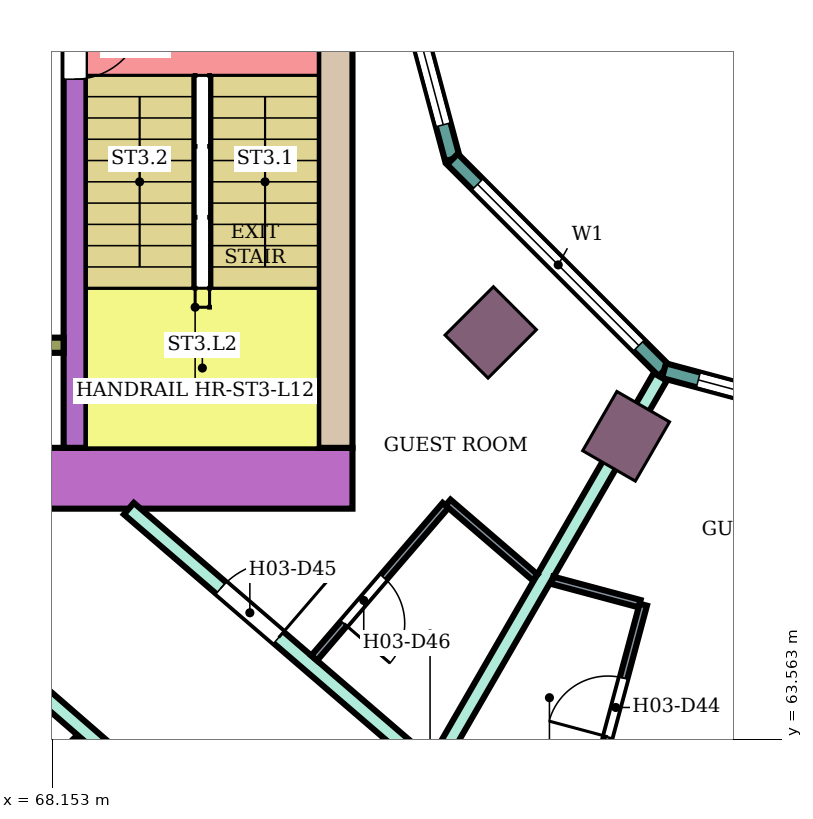
"""IFC4 building model, lengths in metres.
Left out: names, types, materials, properties, quantities, classifications, styles, units other than length and angle.
Written with IfcOpenShell. Run it as: python <this file> out.ifc"""

import sys

from ifc_helpers import new_model, si_unit, direction, frame, frame_2d, origin, origin_2d, place, context, subcontext, project, spatial, rectangle, extrude, element, fill, save


model = new_model("IFC4")
c1 = context("Model", 3, precision=1e-05, world=origin(), true_north=direction((0.0, 1.0)))
c2 = subcontext(c1, "Body", "Model", "MODEL_VIEW")
j1 = project(units=[si_unit("LENGTHUNIT", "METRE"), si_unit("PLANEANGLEUNIT", "RADIAN")], contexts=[c1])
p1 = place(None, origin())
s1 = spatial("IfcSite", under=j1, at=p1, CompositionType="ELEMENT")
p2 = place(p1, origin())
s2 = spatial("IfcBuilding", under=s1, at=p2, CompositionType="ELEMENT")
p3 = place(p2, frame((0.0, 0.0, 55.4)))
s3 = spatial("IfcBuildingStorey", under=s2, at=p3, CompositionType="ELEMENT", Elevation=55.4)
for number, where, z_axis, x_axis in (
    (1, (73.919, 68.919, 0.0), (0.0, 0.0, 1.0), (-0.707, -0.707, 0.0)),
    (2, (75.7, 67.552, 0.0), (0.0, 0.0, 1.0), (-0.5, -0.866, 0.0)),
):
    element("IfcColumn", number, at=place(p3, frame(where, z_axis=z_axis, x_axis=x_axis)), inside=s3, PredefinedType="COLUMN", context=c2, shape_type="SweptSolid", body=[
        extrude(rectangle(XDim=0.9, YDim=0.8, at=origin_2d()), origin(), (0.0, 0.0, 1.0), 3.8),
    ])
p4 = place(p3, frame((72.1, 67.0, 0.0), z_axis=(0.0, 0.0, 1.0), x_axis=(-1.0, 0.0, 0.0)))
e3 = element("IfcWall", 3, at=p4, inside=s3, PredefinedType="SHEAR", context=c2, shape_type="SweptSolid", body=[
    extrude(rectangle(XDim=14.7, YDim=0.8, at=frame_2d((7.35, 0.0))), origin(), (0.0, 0.0, 1.0), 3.48),
])
p5 = place(p4, frame((4.2, 0.0, 0.0)))
e4 = element("IfcOpeningElement", 4, at=p5, cuts=e3, PredefinedType="OPENING", context=c2, shape_type="SweptSolid", body=[
    extrude(rectangle(XDim=2.4, YDim=2.4, at=frame_2d((1.2, 1.2))), frame((0.0, 0.41, 0.0), z_axis=(0.0, -1.0, 0.0), x_axis=(1.0, 0.0, 0.0)), (0.0, 0.0, 1.0), 0.82),
])
p6 = place(p3, frame((71.875, 75.0, 0.0), z_axis=(0.0, 0.0, 1.0), x_axis=(0.0, -1.0, 0.0)))
e5 = element("IfcWall", 5, at=p6, inside=s3, PredefinedType="SHEAR", context=c2, shape_type="SweptSolid", body=[
    extrude(rectangle(XDim=7.6, YDim=0.45, at=frame_2d((3.8, 0.0))), origin(), (0.0, 0.0, 1.0), 3.48),
])
p7 = place(p3, frame((68.45, 75.0, 0.0), z_axis=(0.0, 0.0, 1.0), x_axis=(0.0, -1.0, 0.0)))
e6 = element("IfcWall", 6, at=p7, inside=s3, PredefinedType="SHEAR", context=c2, shape_type="SweptSolid", body=[
    extrude(rectangle(XDim=7.6, YDim=0.3, at=frame_2d((3.8, 0.0))), origin(), (0.0, 0.0, 1.0), 3.48),
])
p8 = place(p7, frame((1.85, 0.0, 0.0)))
e7 = element("IfcOpeningElement", 7, at=p8, cuts=e6, PredefinedType="OPENING", context=c2, shape_type="SweptSolid", body=[
    extrude(rectangle(XDim=0.9, YDim=2.1, at=frame_2d((0.45, 1.05))), frame((0.0, 0.16, 0.0), z_axis=(0.0, -1.0, 0.0), x_axis=(1.0, 0.0, 0.0)), (0.0, 0.0, 1.0), 0.32),
])
p9 = place(p3, frame((68.3, 68.75, 0.0), z_axis=(0.0, 0.0, 1.0), x_axis=(-1.0, 0.0, 0.0)))
e8 = element("IfcWall", 8, at=p9, inside=s3, PredefinedType="SHEAR", context=c2, shape_type="SweptSolid", body=[
    extrude(rectangle(XDim=4.65, YDim=0.2, at=frame_2d((2.325, 0.0))), origin(), (0.0, 0.0, 1.0), 3.48),
])
p10 = place(p3, frame((72.396, 75.0, 0.0), z_axis=(0.0, 0.0, 1.0), x_axis=(0.258789828301, -0.965933654434, 0.0)))
e9 = element("IfcWall", 9, at=p10, inside=s3, PredefinedType="NOTDEFINED", context=c2, shape_type="SweptSolid", body=[
    extrude(rectangle(XDim=3.936, YDim=0.2, at=frame_2d((1.968, 0.0))), origin(), (0.0, 0.0, 1.0), 3.8),
])
p11 = place(p10, frame((0.468, 0.0, 0.9)))
e10 = element("IfcOpeningElement", 10, at=p11, cuts=e9, PredefinedType="OPENING", context=c2, shape_type="SweptSolid", body=[
    extrude(rectangle(XDim=3.0, YDim=2.3, at=frame_2d((1.5, 1.15))), frame((0.0, 0.11, 0.0), z_axis=(0.0, -1.0, 0.0), x_axis=(1.0, 0.0, 0.0)), (0.0, 0.0, 1.0), 0.22),
])
p12 = place(p3, frame((73.415, 71.198, 0.0), z_axis=(0.0, 0.0, 1.0), x_axis=(0.707106781187, -0.707106781187, 0.0)))
e11 = element("IfcWall", 11, at=p12, inside=s3, PredefinedType="NOTDEFINED", context=c2, shape_type="SweptSolid", body=[
    extrude(rectangle(XDim=3.936, YDim=0.2, at=frame_2d((1.968, 0.0))), origin(), (0.0, 0.0, 1.0), 3.8),
])
p13 = place(p12, frame((0.468, 0.0, 0.9)))
e12 = element("IfcOpeningElement", 12, at=p13, cuts=e11, PredefinedType="OPENING", context=c2, shape_type="SweptSolid", body=[
    extrude(rectangle(XDim=3.0, YDim=2.3, at=frame_2d((1.5, 1.15))), frame((0.0, 0.11, 0.0), z_axis=(0.0, -1.0, 0.0), x_axis=(1.0, 0.0, 0.0)), (0.0, 0.0, 1.0), 0.22),
])
p14 = place(p3, frame((76.198, 68.415, 0.0), z_axis=(0.0, 0.0, 1.0), x_axis=(0.965933654434, -0.258789828301, 0.0)))
e13 = element("IfcWall", 13, at=p14, inside=s3, PredefinedType="NOTDEFINED", context=c2, shape_type="SweptSolid", body=[
    extrude(rectangle(XDim=3.936, YDim=0.2, at=frame_2d((1.968, 0.0))), origin(), (0.0, 0.0, 1.0), 3.8),
])
p15 = place(p14, frame((0.468, 0.0, 0.9)))
e14 = element("IfcOpeningElement", 14, at=p15, cuts=e13, PredefinedType="OPENING", context=c2, shape_type="SweptSolid", body=[
    extrude(rectangle(XDim=3.0, YDim=2.3, at=frame_2d((1.5, 1.15))), frame((0.0, 0.11, 0.0), z_axis=(0.0, -1.0, 0.0), x_axis=(1.0, 0.0, 0.0)), (0.0, 0.0, 1.0), 0.22),
])
p16 = place(p3, frame((63.596, 58.596, 0.0), z_axis=(0.0, 0.0, 1.0), x_axis=(0.707106781187, 0.707106781187, 0.0)))
e15 = element("IfcWall", 15, at=p16, inside=s3, PredefinedType="PARTITIONING", context=c2, shape_type="SweptSolid", body=[
    extrude(rectangle(XDim=7.005, YDim=0.2, at=frame_2d((3.503, 0.0))), origin(), (0.0, 0.0, 1.0), 3.35),
])
p17 = place(p3, frame((67.081, 64.971, 0.0), z_axis=(0.0, 0.0, 1.0), x_axis=(0.755031061605, -0.65568902386, 0.0)))
e16 = element("IfcWall", 16, at=p17, inside=s3, PredefinedType="PARTITIONING", context=c2, shape_type="SweptSolid", body=[
    extrude(rectangle(XDim=6.186, YDim=0.2, at=frame_2d((3.093, 0.0))), origin(), (0.0, 0.0, 1.0), 3.35),
])
p18 = place(p17, frame((4.755, 0.0, 0.0)))
e17 = element("IfcOpeningElement", 17, at=p18, cuts=e16, PredefinedType="OPENING", context=c2, shape_type="SweptSolid", body=[
    extrude(rectangle(XDim=1.0, YDim=2.1, at=frame_2d((0.5, 1.05))), frame((0.0, 0.11, 0.0), z_axis=(0.0, -1.0, 0.0), x_axis=(1.0, 0.0, 0.0)), (0.0, 0.0, 1.0), 0.22),
])
p19 = place(p3, frame((69.158, 66.6, 0.0), z_axis=(0.0, 0.0, 1.0), x_axis=(0.757976058094, -0.652282373943, 0.0)))
e18 = element("IfcWall", 18, at=p19, inside=s3, PredefinedType="PARTITIONING", context=c2, shape_type="SweptSolid", body=[
    extrude(rectangle(XDim=5.16, YDim=0.2, at=frame_2d((2.58, 0.0))), origin(), (0.0, 0.0, 1.0), 3.35),
])
p20 = place(p19, frame((1.6, 0.0, 0.0)))
e19 = element("IfcOpeningElement", 19, at=p20, cuts=e18, PredefinedType="OPENING", context=c2, shape_type="SweptSolid", body=[
    extrude(rectangle(XDim=1.0, YDim=2.1, at=frame_2d((0.5, 1.05))), frame((0.0, 0.11, 0.0), z_axis=(0.0, -1.0, 0.0), x_axis=(1.0, 0.0, 0.0)), (0.0, 0.0, 1.0), 0.22),
])
p21 = place(p3, frame((73.17, 63.177, 0.0), z_axis=(0.0, 0.0, 1.0), x_axis=(0.500239348149, 0.865887171959, 0.0)))
e20 = element("IfcWall", 20, at=p21, inside=s3, PredefinedType="PARTITIONING", context=c2, shape_type="SweptSolid", body=[
    extrude(rectangle(XDim=5.955, YDim=0.2, at=frame_2d((2.978, 0.0))), origin(), (0.0, 0.0, 1.0), 3.35),
])
p22 = place(p3, frame((71.596, 64.635, 0.0), z_axis=(0.0, 0.0, 1.0), x_axis=(0.652285007511, 0.757973791748, 0.0)))
e21 = element("IfcWall", 21, at=p22, inside=s3, PredefinedType="PARTITIONING", context=c2, shape_type="SweptSolid", body=[
    extrude(rectangle(XDim=2.65, YDim=0.1, at=frame_2d((1.325, 0.0))), origin(), (0.0, 0.0, 1.0), 3.35),
])
p23 = place(p22, frame((0.6, 0.0, 0.0)))
e22 = element("IfcOpeningElement", 22, at=p23, cuts=e21, PredefinedType="OPENING", context=c2, shape_type="SweptSolid", body=[
    extrude(rectangle(XDim=0.8, YDim=2.1, at=frame_2d((0.4, 1.05))), frame((0.0, 0.06, 0.0), z_axis=(0.0, -1.0, 0.0), x_axis=(1.0, 0.0, 0.0)), (0.0, 0.0, 1.0), 0.12),
])
p24 = place(p3, frame((73.357, 66.681, 0.0), z_axis=(0.0, 0.0, 1.0), x_axis=(0.758263469747, -0.651948242154, 0.0)))
e23 = element("IfcWall", 23, at=p24, inside=s3, PredefinedType="PARTITIONING", context=c2, shape_type="SweptSolid", body=[
    extrude(rectangle(XDim=1.511, YDim=0.1, at=frame_2d((0.755, 0.0))), origin(), (0.0, 0.0, 1.0), 3.35),
])
p25 = place(p3, frame((74.729, 65.657, 0.0), z_axis=(0.0, 0.0, 1.0), x_axis=(0.965948051503, -0.258736085224, 0.0)))
e24 = element("IfcWall", 24, at=p25, inside=s3, PredefinedType="PARTITIONING", context=c2, shape_type="SweptSolid", body=[
    extrude(rectangle(XDim=1.189, YDim=0.1, at=frame_2d((0.594, 0.0))), origin(), (0.0, 0.0, 1.0), 3.35),
])
p26 = place(p3, frame((75.227, 62.729, 0.0), z_axis=(0.0, 0.0, 1.0), x_axis=(0.258945475746, 0.965891940432, 0.0)))
e25 = element("IfcWall", 25, at=p26, inside=s3, PredefinedType="PARTITIONING", context=c2, shape_type="SweptSolid", body=[
    extrude(rectangle(XDim=2.7, YDim=0.1, at=frame_2d((1.35, 0.0))), origin(), (0.0, 0.0, 1.0), 3.35),
])
p27 = place(p26, frame((0.9, 0.0, 0.0)))
e26 = element("IfcOpeningElement", 26, at=p27, cuts=e25, PredefinedType="OPENING", context=c2, shape_type="SweptSolid", body=[
    extrude(rectangle(XDim=0.8, YDim=2.1, at=frame_2d((0.4, 1.05))), frame((0.0, 0.06, 0.0), z_axis=(0.0, -1.0, 0.0), x_axis=(1.0, 0.0, 0.0)), (0.0, 0.0, 1.0), 0.12),
])
p28 = place(p11, origin())
e27 = element("IfcWindow", 27, at=p28, inside=s3, PartitioningType="SINGLE_PANEL", PredefinedType="WINDOW", context=c2, shape_type="SweptSolid", body=[
    extrude(rectangle(XDim=3.0, YDim=2.3, at=frame_2d((1.5, 1.15))), frame((0.0, 0.03, 0.0), z_axis=(0.0, -1.0, 0.0), x_axis=(1.0, 0.0, 0.0)), (0.0, 0.0, 1.0), 0.06),
])
fill(e10, e27)
p29 = place(p13, origin())
e28 = element("IfcWindow", 28, at=p29, inside=s3, PartitioningType="SINGLE_PANEL", PredefinedType="WINDOW", context=c2, shape_type="SweptSolid", body=[
    extrude(rectangle(XDim=3.0, YDim=2.3, at=frame_2d((1.5, 1.15))), frame((0.0, 0.03, 0.0), z_axis=(0.0, -1.0, 0.0), x_axis=(1.0, 0.0, 0.0)), (0.0, 0.0, 1.0), 0.06),
])
fill(e12, e28)
p30 = place(p15, origin())
e29 = element("IfcWindow", 29, at=p30, inside=s3, PartitioningType="SINGLE_PANEL", PredefinedType="WINDOW", context=c2, shape_type="SweptSolid", body=[
    extrude(rectangle(XDim=3.0, YDim=2.3, at=frame_2d((1.5, 1.15))), frame((0.0, 0.03, 0.0), z_axis=(0.0, -1.0, 0.0), x_axis=(1.0, 0.0, 0.0)), (0.0, 0.0, 1.0), 0.06),
])
fill(e14, e29)
p31 = place(p27, origin())
e30 = element("IfcDoor", 30, at=p31, inside=s3, OperationType="SINGLE_SWING_LEFT", PredefinedType="DOOR", context=c2, shape_type="SweptSolid", body=[
    extrude(rectangle(XDim=0.8, YDim=2.1, at=frame_2d((0.4, 1.05))), frame((0.0, 0.025, 0.0), z_axis=(0.0, -1.0, 0.0), x_axis=(1.0, 0.0, 0.0)), (0.0, 0.0, 1.0), 0.05),
])
fill(e26, e30)
p32 = place(p20, origin())
e31 = element("IfcDoor", 31, at=p32, inside=s3, OperationType="SINGLE_SWING_RIGHT", PredefinedType="DOOR", context=c2, shape_type="SweptSolid", body=[
    extrude(rectangle(XDim=1.0, YDim=2.1, at=frame_2d((0.5, 1.05))), frame((0.0, 0.025, 0.0), z_axis=(0.0, -1.0, 0.0), x_axis=(1.0, 0.0, 0.0)), (0.0, 0.0, 1.0), 0.05),
])
fill(e19, e31)
p33 = place(p23, frame((0.8, 0.0, 0.0), z_axis=(0.0, 0.0, 1.0), x_axis=(-1.0, 0.0, 0.0)))
e32 = element("IfcDoor", 32, at=p33, inside=s3, OperationType="SINGLE_SWING_RIGHT", PredefinedType="DOOR", context=c2, shape_type="SweptSolid", body=[
    extrude(rectangle(XDim=0.8, YDim=2.1, at=frame_2d((0.4, 1.05))), frame((0.0, 0.025, 0.0), z_axis=(0.0, -1.0, 0.0), x_axis=(1.0, 0.0, 0.0)), (0.0, 0.0, 1.0), 0.05),
])
fill(e22, e32)
p34 = place(p8, origin())
e33 = element("IfcDoor", 33, at=p34, inside=s3, OperationType="SINGLE_SWING_LEFT", PredefinedType="DOOR", context=c2, shape_type="SweptSolid", body=[
    extrude(rectangle(XDim=0.9, YDim=2.1, at=frame_2d((0.45, 1.05))), frame((0.0, 0.025, 0.0), z_axis=(0.0, -1.0, 0.0), x_axis=(1.0, 0.0, 0.0)), (0.0, 0.0, 1.0), 0.05),
])
fill(e7, e33)
save(model, sys.argv[1])
